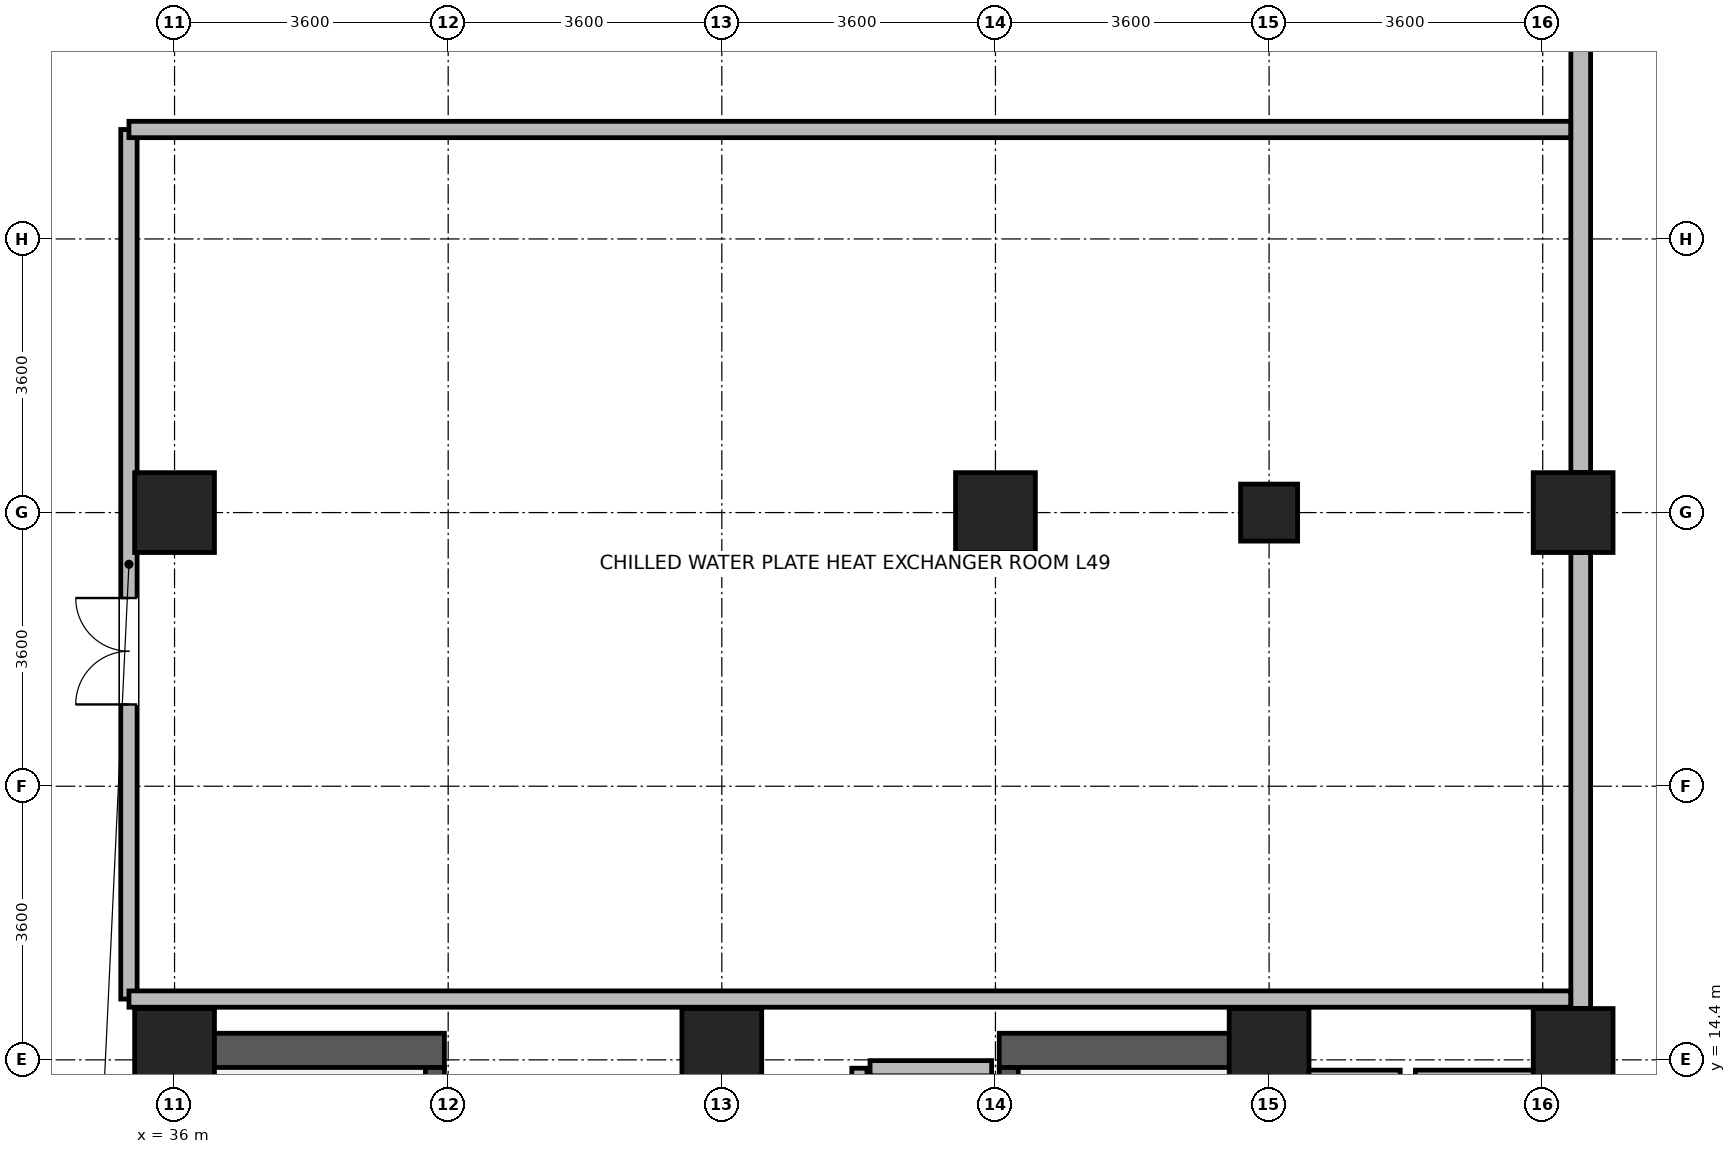
"""IFC4 building model, lengths in metres.
Left out: names, types, materials, properties, quantities, classifications, styles, units other than length and angle.
Written with IfcOpenShell. Run it as: python <this file> out.ifc"""

import sys

from ifc_helpers import new_model, si_unit, direction, frame, frame_2d, origin, origin_2d, place, context, subcontext, project, spatial, rectangle, extrude, source, transform, mapped, element, fill, save


model = new_model("IFC4")
c1 = context("Model", 3, precision=1e-05, world=origin(), true_north=direction((0.0, 1.0)))
c2 = subcontext(c1, "Body", "Model", "MODEL_VIEW")
j1 = project(units=[si_unit("LENGTHUNIT", "METRE"), si_unit("PLANEANGLEUNIT", "RADIAN")], contexts=[c1])
p1 = place(None, origin())
s1 = spatial("IfcSite", under=j1, at=p1, CompositionType="ELEMENT")
p2 = place(p1, origin())
s2 = spatial("IfcBuilding", under=s1, at=p2, CompositionType="ELEMENT")
p3 = place(p2, frame((0.0, 0.0, 192.0)))
s3 = spatial("IfcBuildingStorey", under=s2, at=p3, CompositionType="ELEMENT", Elevation=192.0)
for number, where, z_axis, x_axis in (
    (1, (36.125, 6.85, 0.0), (0.0, 0.0, 1.0), (0.0, 1.0, 0.0)),
    (2, (50.275, 6.85, 0.0), (0.0, 0.0, 1.0), (0.0, 1.0, 0.0)),
):
    element("IfcWall", number, at=place(p3, frame(where, z_axis=z_axis, x_axis=x_axis)), inside=s3, PredefinedType="SHEAR", context=c2, shape_type="SweptSolid", body=[
        extrude(rectangle(XDim=7.9, YDim=0.45, at=frame_2d((3.95, 0.0))), origin(), (0.0, 0.0, 1.0), 4.78),
    ])
for number, where, z_axis, x_axis in (
    (3, (36.35, 14.525, 0.0), (0.0, 0.0, 1.0), (1.0, 0.0, 0.0)),
    (4, (46.85, 14.525, 0.0), (0.0, 0.0, 1.0), (1.0, 0.0, 0.0)),
):
    element("IfcWall", number, at=place(p3, frame(where, z_axis=z_axis, x_axis=x_axis)), inside=s3, PredefinedType="SHEAR", context=c2, shape_type="SweptSolid", body=[
        extrude(rectangle(XDim=3.2, YDim=0.45, at=frame_2d((1.6, 0.0))), origin(), (0.0, 0.0, 1.0), 4.78),
    ])
p4 = place(p3, frame((39.425, 7.3, 0.0), z_axis=(0.0, 0.0, 1.0), x_axis=(0.0, 1.0, 0.0)))
e5 = element("IfcWall", 5, at=p4, inside=s3, PredefinedType="SHEAR", context=c2, shape_type="SweptSolid", body=[
    extrude(rectangle(XDim=7.0, YDim=0.25, at=frame_2d((3.5, 0.0))), origin(), (0.0, 0.0, 1.0), 4.78),
])
p5 = place(p4, frame((0.15, 0.0, 0.0)))
e6 = element("IfcOpeningElement", 6, at=p5, cuts=e5, PredefinedType="OPENING", context=c2, shape_type="SweptSolid", body=[
    extrude(rectangle(XDim=1.1, YDim=2.08, at=frame_2d((0.55, 1.04))), frame((0.0, 0.135, 0.0), z_axis=(0.0, -1.0, 0.0), x_axis=(1.0, 0.0, 0.0)), (0.0, 0.0, 1.0), 0.27),
])
p6 = place(p3, frame((46.975, 7.3, 0.0), z_axis=(0.0, 0.0, 1.0), x_axis=(0.0, 1.0, 0.0)))
e7 = element("IfcWall", 7, at=p6, inside=s3, PredefinedType="SHEAR", context=c2, shape_type="SweptSolid", body=[
    extrude(rectangle(XDim=7.0, YDim=0.25, at=frame_2d((3.5, 0.0))), origin(), (0.0, 0.0, 1.0), 4.78),
])
p7 = place(p6, frame((0.15, 0.0, 0.0)))
e8 = element("IfcOpeningElement", 8, at=p7, cuts=e7, PredefinedType="OPENING", context=c2, shape_type="SweptSolid", body=[
    extrude(rectangle(XDim=1.1, YDim=2.08, at=frame_2d((0.55, 1.04))), frame((0.0, 0.135, 0.0), z_axis=(0.0, -1.0, 0.0), x_axis=(1.0, 0.0, 0.0)), (0.0, 0.0, 1.0), 0.27),
])
m1 = source(origin(), c2, "Body", "SweptSolid", [
    extrude(rectangle(XDim=1.05, YDim=1.05, at=origin_2d()), origin(), (0.0, 0.0, 1.0), 5.2),
])
for number, where, z_axis, x_axis in (
    (9, (36.0, 21.6, 0.0), (0.0, 0.0, 1.0), (1.0, 0.0, 0.0)),
    (10, (46.8, 21.6, 0.0), (0.0, 0.0, 1.0), (1.0, 0.0, 0.0)),
    (11, (36.0, 14.55, 0.0), (0.0, 0.0, 1.0), (1.0, 0.0, 0.0)),
    (12, (43.2, 14.55, 0.0), (0.0, 0.0, 1.0), (1.0, 0.0, 0.0)),
    (13, (50.4, 14.55, 0.0), (0.0, 0.0, 1.0), (1.0, 0.0, 0.0)),
):
    element("IfcColumn", number, at=place(p3, frame(where, z_axis=z_axis, x_axis=x_axis)), inside=s3, PredefinedType="COLUMN", context=c2, shape_type="MappedRepresentation", body=[
        mapped(m1, transform((0.0, 0.0, 0.0), x_axis=(1.0, 0.0, 0.0), y_axis=(0.0, 1.0, 0.0), z_axis=(0.0, 0.0, 1.0), scale=1.0)),
    ])
m2 = source(origin(), c2, "Body", "SweptSolid", [
    extrude(rectangle(XDim=0.75, YDim=0.75, at=origin_2d()), origin(), (0.0, 0.0, 1.0), 5.2),
])
p8 = place(p3, frame((50.4, 21.6, 0.0), z_axis=(0.0, 0.0, 1.0), x_axis=(1.0, 0.0, 0.0)))
e14 = element("IfcColumn", 14, at=p8, inside=s3, PredefinedType="PILASTER", context=c2, shape_type="MappedRepresentation", body=[
    mapped(m2, transform((0.0, 0.0, 0.0), x_axis=(1.0, 0.0, 0.0), y_axis=(0.0, 1.0, 0.0), z_axis=(0.0, 0.0, 1.0), scale=1.0)),
])
for number, where, z_axis, x_axis in (
    (15, (54.4, 14.55, 0.0), (0.0, 0.0, 1.0), (1.0, 0.0, 0.0)),
    (16, (54.4, 21.6, 0.0), (0.0, 0.0, 1.0), (1.0, 0.0, 0.0)),
):
    element("IfcColumn", number, at=place(p3, frame(where, z_axis=z_axis, x_axis=x_axis)), inside=s3, PredefinedType="COLUMN", context=c2, shape_type="MappedRepresentation", body=[
        mapped(m1, transform((0.0, 0.0, 0.0), x_axis=(1.0, 0.0, 0.0), y_axis=(0.0, 1.0, 0.0), z_axis=(0.0, 0.0, 1.0), scale=1.0)),
    ])
for number, where, z_axis, x_axis in (
    (17, (54.5, 21.074, 0.0), (0.0, 0.0, 1.0), (0.0, -1.0, 0.0)),
    (18, (54.5, 28.124, 0.0), (0.0, 0.0, 1.0), (0.0, -1.0, 0.0)),
):
    element("IfcWall", number, at=place(p3, frame(where, z_axis=z_axis, x_axis=x_axis)), inside=s3, PredefinedType="STANDARD", context=c2, shape_type="SweptSolid", body=[
        extrude(rectangle(XDim=5.998, YDim=0.26, at=frame_2d((2.999, 0.0))), origin(), (0.0, 0.0, 1.0), 2.96),
    ])
p9 = place(p3, frame((50.475, 14.165, 0.0), z_axis=(0.0, 0.0, 1.0), x_axis=(1.0, 0.0, 0.0)))
e19 = element("IfcWall", 19, at=p9, inside=s3, PredefinedType="PARTITIONING", context=c2, shape_type="SweptSolid", body=[
    extrude(rectangle(XDim=1.65, YDim=0.2, at=frame_2d((0.825, 0.0))), origin(), (0.0, 0.0, 1.0), 4.76),
])
p10 = place(p3, frame((52.325, 14.165, 0.0), z_axis=(0.0, 0.0, 1.0), x_axis=(1.0, 0.0, 0.0)))
e20 = element("IfcWall", 20, at=p10, inside=s3, PredefinedType="PARTITIONING", context=c2, shape_type="SweptSolid", body=[
    extrude(rectangle(XDim=1.65, YDim=0.2, at=frame_2d((0.825, 0.0))), origin(), (0.0, 0.0, 1.0), 4.76),
])
p11 = place(p3, frame((45.15, 14.29, 0.0), z_axis=(0.0, 0.0, 1.0), x_axis=(1.0, 0.0, 0.0)))
e21 = element("IfcWall", 21, at=p11, inside=s3, PredefinedType="PARTITIONING", context=c2, shape_type="SweptSolid", body=[
    extrude(rectangle(XDim=1.6, YDim=0.2, at=frame_2d((0.8, 0.0))), origin(), (0.0, 0.0, 1.0), 3.76),
])
p12 = place(p3, frame((45.01, 11.61, 0.0), z_axis=(0.0, 0.0, 1.0), x_axis=(0.0, 1.0, 0.0)))
e22 = element("IfcWall", 22, at=p12, inside=s3, PredefinedType="PARTITIONING", context=c2, shape_type="SweptSolid", body=[
    extrude(rectangle(XDim=2.68, YDim=0.2, at=frame_2d((1.34, 0.0))), origin(), (0.0, 0.0, 1.0), 4.76),
])
p13 = place(p3, frame((35.4, 15.2, 0.0), z_axis=(0.0, 0.0, 1.0), x_axis=(0.0, 1.0, 0.0)))
e23 = element("IfcWall", 23, at=p13, inside=s3, PredefinedType="PARTITIONING", context=c2, shape_type="SweptSolid", body=[
    extrude(rectangle(XDim=11.44, YDim=0.215, at=frame_2d((5.72, 0.0))), origin(), (0.0, 0.0, 1.0), 4.76),
])
p14 = place(p13, frame((3.876, 0.0, 0.0)))
e24 = element("IfcOpeningElement", 24, at=p14, cuts=e23, PredefinedType="OPENING", context=c2, shape_type="SweptSolid", body=[
    extrude(rectangle(XDim=1.4, YDim=2.15, at=frame_2d((0.7, 1.075))), frame((0.0, 0.118, 0.0), z_axis=(0.0, -1.0, 0.0), x_axis=(1.0, 0.0, 0.0)), (0.0, 0.0, 1.0), 0.235),
])
for number, where, z_axis, x_axis in (
    (25, (35.4, 15.2, 0.0), (0.0, 0.0, 1.0), (1.0, 0.0, 0.0)),
    (26, (35.4, 26.64, 0.0), (0.0, 0.0, 1.0), (1.0, 0.0, 0.0)),
):
    element("IfcWall", number, at=place(p3, frame(where, z_axis=z_axis, x_axis=x_axis)), inside=s3, PredefinedType="PARTITIONING", context=c2, shape_type="SweptSolid", body=[
        extrude(rectangle(XDim=18.968, YDim=0.215, at=frame_2d((9.484, 0.0))), origin(), (0.0, 0.0, 1.0), 4.76),
    ])
p15 = place(p14, origin())
e27 = element("IfcDoor", 27, at=p15, inside=s3, OperationType="DOUBLE_DOOR_SINGLE_SWING", PredefinedType="DOOR", context=c2, shape_type="SweptSolid", body=[
    extrude(rectangle(XDim=1.4, YDim=2.15, at=frame_2d((0.7, 1.075))), frame((0.0, 0.025, 0.0), z_axis=(0.0, -1.0, 0.0), x_axis=(1.0, 0.0, 0.0)), (0.0, 0.0, 1.0), 0.05),
])
fill(e24, e27)
save(model, sys.argv[1])
